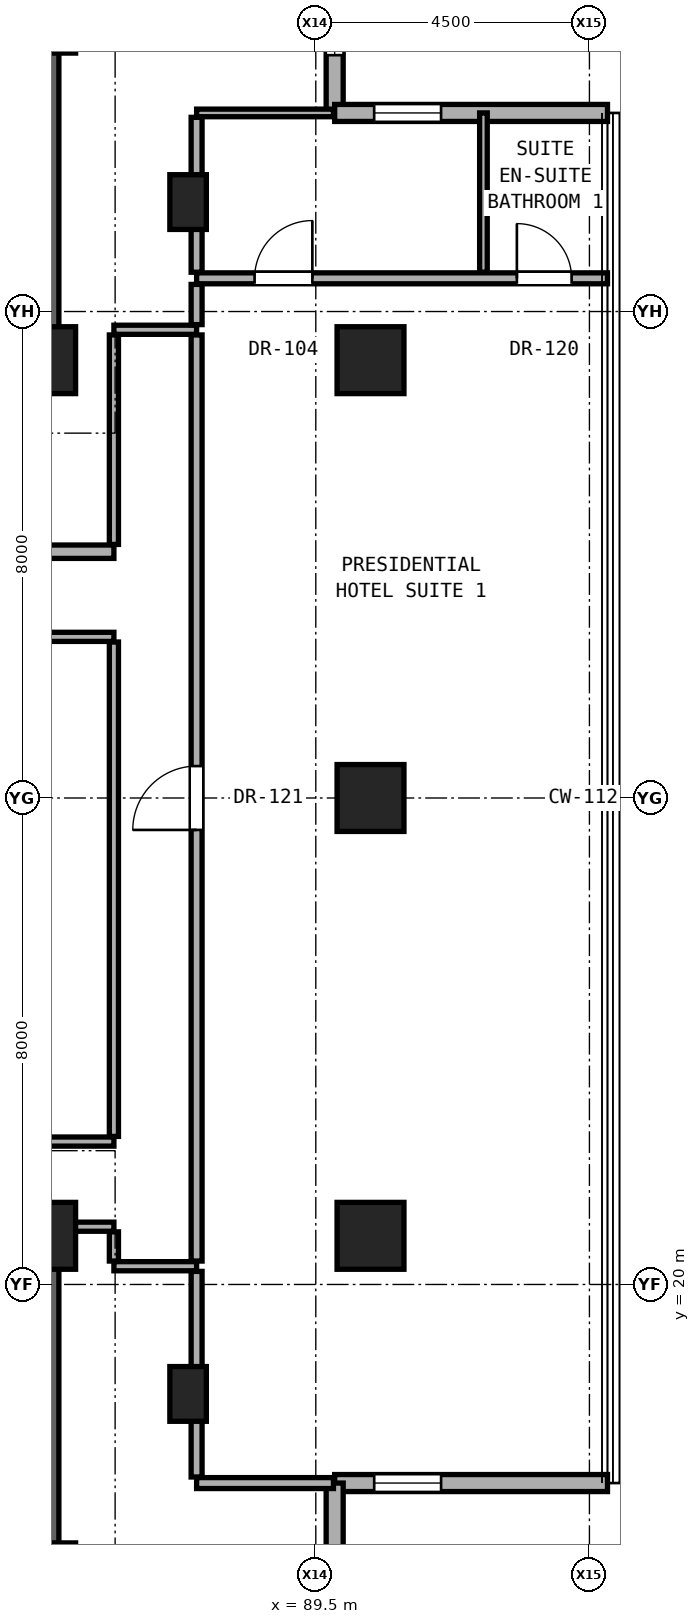
"""IFC4 building model, lengths in metres.
Left out: names, types, materials, properties, quantities, classifications, styles, units other than length and angle.
Written with IfcOpenShell. Run it as: python <this file> out.ifc"""

import sys

from ifc_helpers import new_model, si_unit, direction, frame, frame_2d, origin, origin_2d, place, context, subcontext, project, spatial, rectangle, hollow_rectangle, extrude, element, fill, save


model = new_model("IFC4")
c1 = context("Model", 3, precision=1e-05, world=origin(), true_north=direction((0.0, 1.0)))
c2 = subcontext(c1, "Body", "Model", "MODEL_VIEW")
j1 = project(units=[si_unit("LENGTHUNIT", "METRE"), si_unit("PLANEANGLEUNIT", "RADIAN")], contexts=[c1])
p1 = place(None, origin())
s1 = spatial("IfcSite", under=j1, at=p1, CompositionType="ELEMENT")
p2 = place(p1, origin())
s2 = spatial("IfcBuilding", under=s1, at=p2, CompositionType="ELEMENT")
p3 = place(p2, frame((0.0, 0.0, 131.3)))
s3 = spatial("IfcBuildingStorey", under=s2, at=p3, CompositionType="ELEMENT", Elevation=131.3)
for number, where, z_axis, x_axis in (
    (1, (85.0, 15.2, 0.0), (0.0, 0.0, 1.0), (1.0, 0.0, 0.0)),
    (2, (85.0, 20.8, 0.0), (0.0, 0.0, 1.0), (1.0, 0.0, 0.0)),
    (3, (85.0, 35.2, 0.0), (0.0, 0.0, 1.0), (1.0, 0.0, 0.0)),
    (4, (85.0, 40.8, 0.0), (0.0, 0.0, 1.0), (1.0, 0.0, 0.0)),
):
    element("IfcColumn", number, at=place(p3, frame(where, z_axis=z_axis, x_axis=x_axis)), inside=s3, PredefinedType="COLUMN", context=c2, shape_type="SweptSolid", body=[
        extrude(rectangle(XDim=1.1, YDim=1.1, at=origin_2d()), origin(), (0.0, 0.0, 1.0), 3.3),
    ])
for number, where, z_axis, x_axis in (
    (5, (90.4, 20.8, 0.0), (0.0, 0.0, 1.0), (1.0, 0.0, 0.0)),
    (6, (90.4, 28.0, 0.0), (0.0, 0.0, 1.0), (1.0, 0.0, 0.0)),
    (7, (90.4, 35.2, 0.0), (0.0, 0.0, 1.0), (1.0, 0.0, 0.0)),
):
    element("IfcColumn", number, at=place(p3, frame(where, z_axis=z_axis, x_axis=x_axis)), inside=s3, PredefinedType="COLUMN", context=c2, shape_type="SweptSolid", body=[
        extrude(hollow_rectangle(XDim=1.1, YDim=1.1, WallThickness=0.06, at=origin_2d()), origin(), (0.0, 0.0, 1.0), 3.3),
    ])
for number, where, z_axis, x_axis in (
    (8, (87.4, 18.2, 0.0), (0.0, 0.0, 1.0), (1.0, 0.0, 0.0)),
    (9, (87.4, 37.8, 0.0), (0.0, 0.0, 1.0), (1.0, 0.0, 0.0)),
):
    element("IfcColumn", number, at=place(p3, frame(where, z_axis=z_axis, x_axis=x_axis)), inside=s3, PredefinedType="PILASTER", context=c2, shape_type="SweptSolid", body=[
        extrude(rectangle(XDim=0.6, YDim=0.9, at=origin_2d()), origin(), (0.0, 0.0, 1.0), 3.3),
    ])
for number, where, z_axis, x_axis in (
    (10, (85.0, 35.2, 0.0), (0.0, 0.0, 1.0), (0.0, 1.0, 0.0)),
    (11, (85.0, 15.2, 0.0), (0.0, 0.0, 1.0), (0.0, 1.0, 0.0)),
):
    element("IfcWall", number, at=place(p3, frame(where, z_axis=z_axis, x_axis=x_axis)), inside=s3, PredefinedType="SHEAR", context=c2, shape_type="SweptSolid", body=[
        extrude(rectangle(XDim=5.6, YDim=0.55, at=frame_2d((2.8, 0.0))), origin(), (0.0, 0.0, 1.0), 3.08),
    ])
p4 = place(p3, frame((89.811, 39.266, 0.0), z_axis=(0.0, 0.0, 1.0), x_axis=(0.0, 1.0, 0.0)))
e12 = element("IfcWall", 12, at=p4, inside=s3, PredefinedType="SOLIDWALL", context=c2, shape_type="SweptSolid", body=[
    extrude(rectangle(XDim=4.487, YDim=0.28, at=frame_2d((2.243, 0.0))), origin(), (0.0, 0.0, 1.0), 3.06),
])
p5 = place(p4, frame((0.95, 0.0, 0.85)))
e13 = element("IfcOpeningElement", 13, at=p5, cuts=e12, PredefinedType="OPENING", context=c2, shape_type="SweptSolid", body=[
    extrude(rectangle(XDim=1.1, YDim=2.0, at=frame_2d((0.55, 1.0))), frame((0.0, 0.15, 0.0), z_axis=(0.0, -1.0, 0.0), x_axis=(1.0, 0.0, 0.0)), (0.0, 0.0, 1.0), 0.3),
])
p6 = place(p3, frame((89.811, 16.734, 0.0), z_axis=(0.0, 0.0, 1.0), x_axis=(1.0, 0.0, 0.0)))
e14 = element("IfcWall", 14, at=p6, inside=s3, PredefinedType="SOLIDWALL", context=c2, shape_type="SweptSolid", body=[
    extrude(rectangle(XDim=4.487, YDim=0.28, at=frame_2d((2.243, 0.0))), origin(), (0.0, 0.0, 1.0), 3.06),
])
p7 = place(p6, frame((0.65, 0.0, 0.85)))
e15 = element("IfcOpeningElement", 15, at=p7, cuts=e14, PredefinedType="OPENING", context=c2, shape_type="SweptSolid", body=[
    extrude(rectangle(XDim=1.1, YDim=2.0, at=frame_2d((0.55, 1.0))), frame((0.0, 0.15, 0.0), z_axis=(0.0, -1.0, 0.0), x_axis=(1.0, 0.0, 0.0)), (0.0, 0.0, 1.0), 0.3),
])
p8 = place(p3, frame((89.811, 12.248, 0.0), z_axis=(0.0, 0.0, 1.0), x_axis=(0.0, 1.0, 0.0)))
e16 = element("IfcWall", 16, at=p8, inside=s3, PredefinedType="SOLIDWALL", context=c2, shape_type="SweptSolid", body=[
    extrude(rectangle(XDim=4.487, YDim=0.28, at=frame_2d((2.243, 0.0))), origin(), (0.0, 0.0, 1.0), 3.06),
])
p9 = place(p3, frame((94.297, 39.266, 0.0), z_axis=(0.0, 0.0, 1.0), x_axis=(-1.0, 0.0, 0.0)))
e17 = element("IfcWall", 17, at=p9, inside=s3, PredefinedType="SOLIDWALL", context=c2, shape_type="SweptSolid", body=[
    extrude(rectangle(XDim=4.487, YDim=0.28, at=frame_2d((2.243, 0.0))), origin(), (0.0, 0.0, 1.0), 3.06),
])
p10 = place(p9, frame((2.737, 0.0, 0.85)))
e18 = element("IfcOpeningElement", 18, at=p10, cuts=e17, PredefinedType="OPENING", context=c2, shape_type="SweptSolid", body=[
    extrude(rectangle(XDim=1.1, YDim=2.0, at=frame_2d((0.55, 1.0))), frame((0.0, 0.15, 0.0), z_axis=(0.0, -1.0, 0.0), x_axis=(1.0, 0.0, 0.0)), (0.0, 0.0, 1.0), 0.3),
])
p11 = place(p3, frame((87.54, 16.734, 0.0), z_axis=(0.0, 0.0, 1.0), x_axis=(1.0, 0.0, 0.0)))
e19 = element("IfcWall", 19, at=p11, inside=s3, PredefinedType="PARTITIONING", context=c2, shape_type="SweptSolid", body=[
    extrude(rectangle(XDim=2.25, YDim=0.18, at=frame_2d((1.125, 0.0))), origin(), (0.0, 0.0, 1.0), 3.08),
])
p12 = place(p3, frame((86.18, 20.3, 0.0), z_axis=(0.0, 0.0, 1.0), x_axis=(1.0, 0.0, 0.0)))
e20 = element("IfcWall", 20, at=p12, inside=s3, PredefinedType="PARTITIONING", context=c2, shape_type="SweptSolid", body=[
    extrude(rectangle(XDim=1.36, YDim=0.15, at=frame_2d((0.68, 0.0))), origin(), (0.0, 0.0, 1.0), 3.08),
])
p13 = place(p3, frame((85.27, 20.95, 0.0), z_axis=(0.0, 0.0, 1.0), x_axis=(1.0, 0.0, 0.0)))
e21 = element("IfcWall", 21, at=p13, inside=s3, PredefinedType="PARTITIONING", context=c2, shape_type="SweptSolid", body=[
    extrude(rectangle(XDim=0.91, YDim=0.15, at=frame_2d((0.455, 0.0))), origin(), (0.0, 0.0, 1.0), 2.472),
])
p14 = place(p3, frame((66.68, 22.35, 0.0), z_axis=(0.0, 0.0, 1.0), x_axis=(1.0, 0.0, 0.0)))
e22 = element("IfcWall", 22, at=p14, inside=s3, PredefinedType="PARTITIONING", context=c2, shape_type="SweptSolid", body=[
    extrude(rectangle(XDim=19.5, YDim=0.15, at=frame_2d((9.75, 0.0))), origin(), (0.0, 0.0, 1.0), 2.216),
])
p15 = place(p14, frame((7.954, 0.0, 0.0)))
e23 = element("IfcOpeningElement", 23, at=p15, cuts=e22, PredefinedType="OPENING", context=c2, shape_type="SweptSolid", body=[
    extrude(rectangle(XDim=1.05, YDim=2.2, at=frame_2d((0.525, 1.1))), frame((0.0, 0.085, 0.0), z_axis=(0.0, -1.0, 0.0), x_axis=(1.0, 0.0, 0.0)), (0.0, 0.0, 1.0), 0.17),
])
p16 = place(p3, frame((66.68, 30.65, 0.0), z_axis=(0.0, 0.0, 1.0), x_axis=(1.0, 0.0, 0.0)))
e24 = element("IfcWall", 24, at=p16, inside=s3, PredefinedType="PARTITIONING", context=c2, shape_type="SweptSolid", body=[
    extrude(rectangle(XDim=19.5, YDim=0.15, at=frame_2d((9.75, 0.0))), origin(), (0.0, 0.0, 1.0), 2.216),
])
p17 = place(p16, frame((3.745, 0.0, 0.0)))
e25 = element("IfcOpeningElement", 25, at=p17, cuts=e24, PredefinedType="OPENING", context=c2, shape_type="SweptSolid", body=[
    extrude(rectangle(XDim=0.95, YDim=2.15, at=frame_2d((0.475, 1.075))), frame((0.0, 0.085, 0.0), z_axis=(0.0, -1.0, 0.0), x_axis=(1.0, 0.0, 0.0)), (0.0, 0.0, 1.0), 0.17),
])
p18 = place(p16, frame((14.999, 0.0, 0.0)))
e26 = element("IfcOpeningElement", 26, at=p18, cuts=e24, PredefinedType="OPENING", context=c2, shape_type="SweptSolid", body=[
    extrude(rectangle(XDim=1.05, YDim=2.2, at=frame_2d((0.525, 1.1))), frame((0.0, 0.085, 0.0), z_axis=(0.0, -1.0, 0.0), x_axis=(1.0, 0.0, 0.0)), (0.0, 0.0, 1.0), 0.17),
])
p19 = place(p3, frame((71.55, 32.05, 0.0), z_axis=(0.0, 0.0, 1.0), x_axis=(1.0, 0.0, 0.0)))
e27 = element("IfcWall", 27, at=p19, inside=s3, PredefinedType="SOLIDWALL", context=c2, shape_type="SweptSolid", body=[
    extrude(rectangle(XDim=14.63, YDim=0.22, at=frame_2d((7.315, 0.0))), origin(), (0.0, 0.0, 1.0), 2.216),
])
p20 = place(p19, frame((6.065, 0.0, 0.0)))
e28 = element("IfcOpeningElement", 28, at=p20, cuts=e27, PredefinedType="OPENING", context=c2, shape_type="SweptSolid", body=[
    extrude(rectangle(XDim=0.85, YDim=2.01, at=frame_2d((0.425, 1.005))), frame((0.0, 0.12, 0.0), z_axis=(0.0, -1.0, 0.0), x_axis=(1.0, 0.0, 0.0)), (0.0, 0.0, 1.0), 0.24),
])
p21 = place(p19, frame((10.535, 0.0, 0.0)))
e29 = element("IfcOpeningElement", 29, at=p21, cuts=e27, PredefinedType="OPENING", context=c2, shape_type="SweptSolid", body=[
    extrude(rectangle(XDim=0.95, YDim=2.15, at=frame_2d((0.475, 1.075))), frame((0.0, 0.12, 0.0), z_axis=(0.0, -1.0, 0.0), x_axis=(1.0, 0.0, 0.0)), (0.0, 0.0, 1.0), 0.24),
])
p22 = place(p19, frame((0.7, 0.0, 0.0)))
e30 = element("IfcOpeningElement", 30, at=p22, cuts=e27, PredefinedType="OPENING", context=c2, shape_type="SweptSolid", body=[
    extrude(rectangle(XDim=0.85, YDim=2.01, at=frame_2d((0.425, 1.005))), frame((0.0, 0.12, 0.0), z_axis=(0.0, -1.0, 0.0), x_axis=(1.0, 0.0, 0.0)), (0.0, 0.0, 1.0), 0.24),
])
p23 = place(p19, frame((2.55, 0.0, 0.0)))
e31 = element("IfcOpeningElement", 31, at=p23, cuts=e27, PredefinedType="OPENING", context=c2, shape_type="SweptSolid", body=[
    extrude(rectangle(XDim=0.85, YDim=2.01, at=frame_2d((0.425, 1.005))), frame((0.0, 0.12, 0.0), z_axis=(0.0, -1.0, 0.0), x_axis=(1.0, 0.0, 0.0)), (0.0, 0.0, 1.0), 0.24),
])
p24 = place(p3, frame((86.18, 35.7, 0.0), z_axis=(0.0, 0.0, 1.0), x_axis=(1.0, 0.0, 0.0)))
e32 = element("IfcWall", 32, at=p24, inside=s3, PredefinedType="PARTITIONING", context=c2, shape_type="SweptSolid", body=[
    extrude(rectangle(XDim=1.36, YDim=0.15, at=frame_2d((0.68, 0.0))), origin(), (0.0, 0.0, 1.0), 3.08),
])
p25 = place(p3, frame((87.54, 36.546, 0.0), z_axis=(0.0, 0.0, 1.0), x_axis=(1.0, 0.0, 0.0)))
e33 = element("IfcWall", 33, at=p25, inside=s3, PredefinedType="PARTITIONING", context=c2, shape_type="SweptSolid", body=[
    extrude(rectangle(XDim=6.757, YDim=0.18, at=frame_2d((3.378, 0.0))), origin(), (0.0, 0.0, 1.0), 2.523),
])
p26 = place(p25, frame((0.954, 0.0, 0.0)))
e34 = element("IfcOpeningElement", 34, at=p26, cuts=e33, PredefinedType="OPENING", context=c2, shape_type="SweptSolid", body=[
    extrude(rectangle(XDim=0.95, YDim=2.15, at=frame_2d((0.475, 1.075))), frame((0.0, 0.1, 0.0), z_axis=(0.0, -1.0, 0.0), x_axis=(1.0, 0.0, 0.0)), (0.0, 0.0, 1.0), 0.2),
])
p27 = place(p25, frame((5.267, 0.0, 0.0)))
e35 = element("IfcOpeningElement", 35, at=p27, cuts=e33, PredefinedType="OPENING", context=c2, shape_type="SweptSolid", body=[
    extrude(rectangle(XDim=0.9, YDim=2.1, at=frame_2d((0.45, 1.05))), frame((0.0, 0.1, 0.0), z_axis=(0.0, -1.0, 0.0), x_axis=(1.0, 0.0, 0.0)), (0.0, 0.0, 1.0), 0.2),
])
p28 = place(p3, frame((87.54, 39.266, 0.0), z_axis=(0.0, 0.0, 1.0), x_axis=(1.0, 0.0, 0.0)))
e36 = element("IfcWall", 36, at=p28, inside=s3, PredefinedType="PARTITIONING", context=c2, shape_type="SweptSolid", body=[
    extrude(rectangle(XDim=2.25, YDim=0.125, at=frame_2d((1.125, 0.0))), origin(), (0.0, 0.0, 1.0), 3.08),
])
p29 = place(p3, frame((86.18, 20.385, 0.0), z_axis=(0.0, 0.0, 1.0), x_axis=(0.0, 1.0, 0.0)))
e37 = element("IfcWall", 37, at=p29, inside=s3, PredefinedType="PARTITIONING", context=c2, shape_type="SweptSolid", body=[
    extrude(rectangle(XDim=0.48, YDim=0.15, at=frame_2d((0.24, 0.0))), origin(), (0.0, 0.0, 1.0), 2.472),
])
p30 = place(p3, frame((86.18, 22.435, 0.0), z_axis=(0.0, 0.0, 1.0), x_axis=(0.0, 1.0, 0.0)))
e38 = element("IfcWall", 38, at=p30, inside=s3, PredefinedType="PARTITIONING", context=c2, shape_type="SweptSolid", body=[
    extrude(rectangle(XDim=8.13, YDim=0.15, at=frame_2d((4.065, 0.0))), origin(), (0.0, 0.0, 1.0), 2.376),
])
p31 = place(p3, frame((86.18, 32.17, 0.0), z_axis=(0.0, 0.0, 1.0), x_axis=(0.0, 1.0, 0.0)))
e39 = element("IfcWall", 39, at=p31, inside=s3, PredefinedType="PARTITIONING", context=c2, shape_type="SweptSolid", body=[
    extrude(rectangle(XDim=3.445, YDim=0.15, at=frame_2d((1.723, 0.0))), origin(), (0.0, 0.0, 1.0), 2.472),
])
p32 = place(p3, frame((87.54, 16.834, 0.0), z_axis=(0.0, 0.0, 1.0), x_axis=(0.0, 1.0, 0.0)))
e40 = element("IfcWall", 40, at=p32, inside=s3, PredefinedType="PARTITIONING", context=c2, shape_type="SweptSolid", body=[
    extrude(rectangle(XDim=3.381, YDim=0.18, at=frame_2d((1.69, 0.0))), origin(), (0.0, 0.0, 1.0), 2.523),
])
p33 = place(p3, frame((87.54, 20.385, 0.0), z_axis=(0.0, 0.0, 1.0), x_axis=(0.0, 1.0, 0.0)))
e41 = element("IfcWall", 41, at=p33, inside=s3, PredefinedType="PARTITIONING", context=c2, shape_type="SweptSolid", body=[
    extrude(rectangle(XDim=15.23, YDim=0.18, at=frame_2d((7.615, 0.0))), origin(), (0.0, 0.0, 1.0), 2.376),
])
p34 = place(p33, frame((7.09, 0.0, 0.0)))
e42 = element("IfcOpeningElement", 42, at=p34, cuts=e41, PredefinedType="OPENING", context=c2, shape_type="SweptSolid", body=[
    extrude(rectangle(XDim=1.05, YDim=2.2, at=frame_2d((0.525, 1.1))), frame((0.0, 0.1, 0.0), z_axis=(0.0, -1.0, 0.0), x_axis=(1.0, 0.0, 0.0)), (0.0, 0.0, 1.0), 0.2),
])
p35 = place(p3, frame((87.54, 35.785, 0.0), z_axis=(0.0, 0.0, 1.0), x_axis=(0.0, 1.0, 0.0)))
e43 = element("IfcWall", 43, at=p35, inside=s3, PredefinedType="PARTITIONING", context=c2, shape_type="SweptSolid", body=[
    extrude(rectangle(XDim=0.661, YDim=0.18, at=frame_2d((0.331, 0.0))), origin(), (0.0, 0.0, 1.0), 3.08),
])
p36 = place(p3, frame((87.54, 36.646, 0.0), z_axis=(0.0, 0.0, 1.0), x_axis=(0.0, 1.0, 0.0)))
e44 = element("IfcWall", 44, at=p36, inside=s3, PredefinedType="PARTITIONING", context=c2, shape_type="SweptSolid", body=[
    extrude(rectangle(XDim=2.548, YDim=0.18, at=frame_2d((1.274, 0.0))), origin(), (0.0, 0.0, 1.0), 2.523),
])
p37 = place(p3, frame((92.257, 36.646, 0.0), z_axis=(0.0, 0.0, 1.0), x_axis=(0.0, 1.0, 0.0)))
e45 = element("IfcWall", 45, at=p37, inside=s3, PredefinedType="PARTITIONING", context=c2, shape_type="SweptSolid", body=[
    extrude(rectangle(XDim=2.62, YDim=0.125, at=frame_2d((1.31, 0.0))), origin(), (0.0, 0.0, 1.0), 3.08),
])
p38 = place(p5, origin())
e46 = element("IfcWindow", 46, at=p38, inside=s3, PartitioningType="SINGLE_PANEL", PredefinedType="WINDOW", context=c2, shape_type="SweptSolid", body=[
    extrude(rectangle(XDim=1.1, YDim=2.0, at=frame_2d((0.55, 1.0))), frame((0.0, 0.03, 0.0), z_axis=(0.0, -1.0, 0.0), x_axis=(1.0, 0.0, 0.0)), (0.0, 0.0, 1.0), 0.06),
])
fill(e13, e46)
p39 = place(p7, origin())
e47 = element("IfcWindow", 47, at=p39, inside=s3, PartitioningType="SINGLE_PANEL", PredefinedType="WINDOW", context=c2, shape_type="SweptSolid", body=[
    extrude(rectangle(XDim=1.1, YDim=2.0, at=frame_2d((0.55, 1.0))), frame((0.0, 0.03, 0.0), z_axis=(0.0, -1.0, 0.0), x_axis=(1.0, 0.0, 0.0)), (0.0, 0.0, 1.0), 0.06),
])
fill(e15, e47)
p40 = place(p10, origin())
e48 = element("IfcWindow", 48, at=p40, inside=s3, PartitioningType="SINGLE_PANEL", PredefinedType="WINDOW", context=c2, shape_type="SweptSolid", body=[
    extrude(rectangle(XDim=1.1, YDim=2.0, at=frame_2d((0.55, 1.0))), frame((0.0, 0.03, 0.0), z_axis=(0.0, -1.0, 0.0), x_axis=(1.0, 0.0, 0.0)), (0.0, 0.0, 1.0), 0.06),
])
fill(e18, e48)
p41 = place(p34, origin())
e49 = element("IfcDoor", 49, at=p41, inside=s3, OperationType="SINGLE_SWING_LEFT", PredefinedType="DOOR", context=c2, shape_type="SweptSolid", body=[
    extrude(rectangle(XDim=1.05, YDim=2.2, at=frame_2d((0.525, 1.1))), frame((0.0, 0.025, 0.0), z_axis=(0.0, -1.0, 0.0), x_axis=(1.0, 0.0, 0.0)), (0.0, 0.0, 1.0), 0.05),
])
fill(e42, e49)
p42 = place(p26, origin())
e50 = element("IfcDoor", 50, at=p42, inside=s3, OperationType="SINGLE_SWING_RIGHT", PredefinedType="DOOR", context=c2, shape_type="SweptSolid", body=[
    extrude(rectangle(XDim=0.95, YDim=2.15, at=frame_2d((0.475, 1.075))), frame((0.0, 0.025, 0.0), z_axis=(0.0, -1.0, 0.0), x_axis=(1.0, 0.0, 0.0)), (0.0, 0.0, 1.0), 0.05),
])
fill(e34, e50)
p43 = place(p27, origin())
e51 = element("IfcDoor", 51, at=p43, inside=s3, OperationType="SINGLE_SWING_LEFT", PredefinedType="DOOR", context=c2, shape_type="SweptSolid", body=[
    extrude(rectangle(XDim=0.9, YDim=2.1, at=frame_2d((0.45, 1.05))), frame((0.0, 0.025, 0.0), z_axis=(0.0, -1.0, 0.0), x_axis=(1.0, 0.0, 0.0)), (0.0, 0.0, 1.0), 0.05),
])
fill(e35, e51)
save(model, sys.argv[1])
